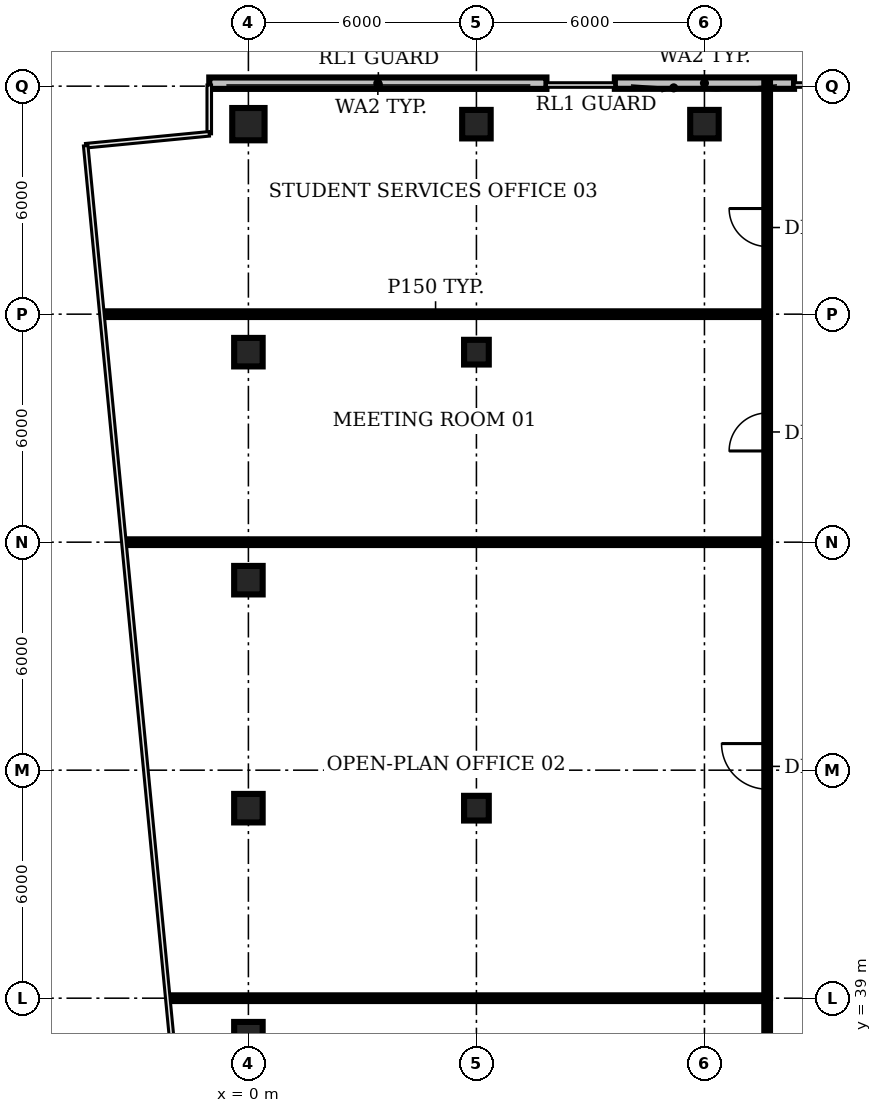
"""IFC4 building model, lengths in metres.
Left out: names, types, materials, properties, quantities, classifications, styles, units other than length and angle.
Written with IfcOpenShell. Run it as: python <this file> out.ifc"""

import sys

from ifc_helpers import new_model, si_unit, direction, frame, frame_2d, origin, origin_2d, place, context, subcontext, project, spatial, rectangle, circle, extrude, element, fill, save


model = new_model("IFC4")
c1 = context("Model", 3, precision=1e-05, world=origin(), true_north=direction((0.0, 1.0)))
c2 = subcontext(c1, "Body", "Model", "MODEL_VIEW")
j1 = project(units=[si_unit("LENGTHUNIT", "METRE"), si_unit("PLANEANGLEUNIT", "RADIAN")], contexts=[c1])
p1 = place(None, origin())
s1 = spatial("IfcSite", under=j1, at=p1, CompositionType="ELEMENT")
p2 = place(p1, origin())
s2 = spatial("IfcBuilding", under=s1, at=p2, CompositionType="ELEMENT")
p3 = place(p2, frame((0.0, 0.0, 310.4)))
s3 = spatial("IfcBuildingStorey", under=s2, at=p3, CompositionType="ELEMENT", Elevation=310.4)
for number, where, z_axis, x_axis in (
    (1, (0.0, 38.0, 0.0), (0.0, 0.0, 1.0), (1.0, 0.0, 0.0)),
    (2, (0.0, 44.0, 0.0), (0.0, 0.0, 1.0), (1.0, 0.0, 0.0)),
    (3, (0.0, 50.0, 0.0), (0.0, 0.0, 1.0), (1.0, 0.0, 0.0)),
    (4, (0.0, 56.0, 0.0), (0.0, 0.0, 1.0), (1.0, 0.0, 0.0)),
):
    element("IfcColumn", number, at=place(p3, frame(where, z_axis=z_axis, x_axis=x_axis)), inside=s3, PredefinedType="COLUMN", context=c2, shape_type="SweptSolid", body=[
        extrude(rectangle(XDim=0.75, YDim=0.75, at=origin_2d()), origin(), (0.0, 0.0, 1.0), 3.9),
    ])
p4 = place(p3, frame((0.0, 62.0, 0.0), z_axis=(0.0, 0.0, 1.0), x_axis=(1.0, 0.0, 0.0)))
e5 = element("IfcColumn", 5, at=p4, inside=s3, PredefinedType="COLUMN", context=c2, shape_type="SweptSolid", body=[
    extrude(circle(Radius=0.425, at=origin_2d()), origin(), (0.0, 0.0, 1.0), 3.9),
])
for number, where, z_axis, x_axis in (
    (6, (6.0, 44.0, 0.0), (0.0, 0.0, 1.0), (1.0, 0.0, 0.0)),
    (7, (6.0, 56.0, 0.0), (0.0, 0.0, 1.0), (1.0, 0.0, 0.0)),
):
    element("IfcColumn", number, at=place(p3, frame(where, z_axis=z_axis, x_axis=x_axis)), inside=s3, PredefinedType="COLUMN", context=c2, shape_type="SweptSolid", body=[
        extrude(rectangle(XDim=0.65, YDim=0.65, at=origin_2d()), origin(), (0.0, 0.0, 1.0), 3.9),
    ])
for number, where, z_axis, x_axis in (
    (8, (6.0, 62.0, 0.0), (0.0, 0.0, 1.0), (1.0, 0.0, 0.0)),
    (9, (12.0, 62.0, 0.0), (0.0, 0.0, 1.0), (1.0, 0.0, 0.0)),
):
    element("IfcColumn", number, at=place(p3, frame(where, z_axis=z_axis, x_axis=x_axis)), inside=s3, PredefinedType="COLUMN", context=c2, shape_type="SweptSolid", body=[
        extrude(rectangle(XDim=0.75, YDim=0.75, at=origin_2d()), origin(), (0.0, 0.0, 1.0), 3.9),
    ])
p5 = place(p3, frame((14.357, 63.08, 0.0), z_axis=(0.0, 0.0, 1.0), x_axis=(-1.0, 0.0, 0.0)))
e10 = element("IfcWall", 10, at=p5, inside=s3, PredefinedType="SOLIDWALL", context=c2, shape_type="SweptSolid", body=[
    extrude(rectangle(XDim=4.715, YDim=0.3, at=frame_2d((2.357, 0.0))), origin(), (0.0, 0.0, 1.0), 3.9),
])
p6 = place(p3, frame((7.843, 63.078, 0.0), z_axis=(0.0, 0.0, 1.0), x_axis=(-1.0, 0.0, 0.0)))
e11 = element("IfcWall", 11, at=p6, inside=s3, PredefinedType="SOLIDWALL", context=c2, shape_type="SweptSolid", body=[
    extrude(rectangle(XDim=8.873, YDim=0.3, at=frame_2d((4.436, 0.0))), origin(), (0.0, 0.0, 1.0), 3.9),
])
p7 = place(p3, frame((-3.8, 57.0, 0.0), z_axis=(0.0, 0.0, 1.0), x_axis=(1.0, 0.0, 0.0)))
e12 = element("IfcWall", 12, at=p7, inside=s3, PredefinedType="PARTITIONING", context=c2, shape_type="SweptSolid", body=[
    extrude(rectangle(XDim=17.45, YDim=0.15, at=frame_2d((8.725, 0.0))), origin(), (0.0, 0.0, 1.0), 2.48),
])
p8 = place(p3, frame((-3.23, 51.0, 0.0), z_axis=(0.0, 0.0, 1.0), x_axis=(1.0, 0.0, 0.0)))
e13 = element("IfcWall", 13, at=p8, inside=s3, PredefinedType="PARTITIONING", context=c2, shape_type="SweptSolid", body=[
    extrude(rectangle(XDim=16.88, YDim=0.15, at=frame_2d((8.44, 0.0))), origin(), (0.0, 0.0, 1.0), 2.48),
])
p9 = place(p3, frame((-2.049, 39.0, 0.0), z_axis=(0.0, 0.0, 1.0), x_axis=(1.0, 0.0, 0.0)))
e14 = element("IfcWall", 14, at=p9, inside=s3, PredefinedType="PARTITIONING", context=c2, shape_type="SweptSolid", body=[
    extrude(rectangle(XDim=15.698, YDim=0.15, at=frame_2d((7.849, 0.0))), origin(), (0.0, 0.0, 1.0), 2.48),
])
p10 = place(p3, frame((13.65, 33.8, 0.0), z_axis=(0.0, 0.0, 1.0), x_axis=(0.0, 1.0, 0.0)))
e15 = element("IfcWall", 15, at=p10, inside=s3, PredefinedType="PARTITIONING", context=c2, shape_type="SweptSolid", body=[
    extrude(rectangle(XDim=5.2, YDim=0.15, at=frame_2d((2.6, 0.0))), origin(), (0.0, 0.0, 1.0), 2.48),
])
p11 = place(p10, frame((2.2, 0.0, 0.0)))
e16 = element("IfcOpeningElement", 16, at=p11, cuts=e15, PredefinedType="OPENING", context=c2, shape_type="SweptSolid", body=[
    extrude(rectangle(XDim=1.0, YDim=2.1, at=frame_2d((0.5, 1.05))), frame((0.0, 0.085, 0.0), z_axis=(0.0, -1.0, 0.0), x_axis=(1.0, 0.0, 0.0)), (0.0, 0.0, 1.0), 0.17),
])
p12 = place(p3, frame((13.65, 39.0, 0.0), z_axis=(0.0, 0.0, 1.0), x_axis=(0.0, 1.0, 0.0)))
e17 = element("IfcWall", 17, at=p12, inside=s3, PredefinedType="PARTITIONING", context=c2, shape_type="SweptSolid", body=[
    extrude(rectangle(XDim=12.0, YDim=0.15, at=frame_2d((6.0, 0.0))), origin(), (0.0, 0.0, 1.0), 2.48),
])
p13 = place(p12, frame((5.5, 0.0, 0.0)))
e18 = element("IfcOpeningElement", 18, at=p13, cuts=e17, PredefinedType="OPENING", context=c2, shape_type="SweptSolid", body=[
    extrude(rectangle(XDim=1.2, YDim=2.1, at=frame_2d((0.6, 1.05))), frame((0.0, 0.085, 0.0), z_axis=(0.0, -1.0, 0.0), x_axis=(1.0, 0.0, 0.0)), (0.0, 0.0, 1.0), 0.17),
])
p14 = place(p3, frame((13.65, 51.0, 0.0), z_axis=(0.0, 0.0, 1.0), x_axis=(0.0, 1.0, 0.0)))
e19 = element("IfcWall", 19, at=p14, inside=s3, PredefinedType="PARTITIONING", context=c2, shape_type="SweptSolid", body=[
    extrude(rectangle(XDim=6.0, YDim=0.15, at=frame_2d((3.0, 0.0))), origin(), (0.0, 0.0, 1.0), 2.48),
])
p15 = place(p14, frame((2.4, 0.0, 0.0)))
e20 = element("IfcOpeningElement", 20, at=p15, cuts=e19, PredefinedType="OPENING", context=c2, shape_type="SweptSolid", body=[
    extrude(rectangle(XDim=1.0, YDim=2.1, at=frame_2d((0.5, 1.05))), frame((0.0, 0.085, 0.0), z_axis=(0.0, -1.0, 0.0), x_axis=(1.0, 0.0, 0.0)), (0.0, 0.0, 1.0), 0.17),
])
p16 = place(p3, frame((13.65, 57.0, 0.0), z_axis=(0.0, 0.0, 1.0), x_axis=(0.0, 1.0, 0.0)))
e21 = element("IfcWall", 21, at=p16, inside=s3, PredefinedType="PARTITIONING", context=c2, shape_type="SweptSolid", body=[
    extrude(rectangle(XDim=6.09, YDim=0.15, at=frame_2d((3.045, 0.0))), origin(), (0.0, 0.0, 1.0), 2.48),
])
p17 = place(p16, frame((1.78, 0.0, 0.0)))
e22 = element("IfcOpeningElement", 22, at=p17, cuts=e21, PredefinedType="OPENING", context=c2, shape_type="SweptSolid", body=[
    extrude(rectangle(XDim=1.0, YDim=2.1, at=frame_2d((0.5, 1.05))), frame((0.0, 0.085, 0.0), z_axis=(0.0, -1.0, 0.0), x_axis=(1.0, 0.0, 0.0)), (0.0, 0.0, 1.0), 0.17),
])
p18 = place(p13, origin())
e23 = element("IfcDoor", 23, at=p18, inside=s3, OperationType="SINGLE_SWING_RIGHT", PredefinedType="DOOR", context=c2, shape_type="SweptSolid", body=[
    extrude(rectangle(XDim=1.2, YDim=2.1, at=frame_2d((0.6, 1.05))), frame((0.0, 0.025, 0.0), z_axis=(0.0, -1.0, 0.0), x_axis=(1.0, 0.0, 0.0)), (0.0, 0.0, 1.0), 0.05),
])
fill(e18, e23)
p19 = place(p15, origin())
e24 = element("IfcDoor", 24, at=p19, inside=s3, OperationType="SINGLE_SWING_LEFT", PredefinedType="DOOR", context=c2, shape_type="SweptSolid", body=[
    extrude(rectangle(XDim=1.0, YDim=2.1, at=frame_2d((0.5, 1.05))), frame((0.0, 0.025, 0.0), z_axis=(0.0, -1.0, 0.0), x_axis=(1.0, 0.0, 0.0)), (0.0, 0.0, 1.0), 0.05),
])
fill(e20, e24)
p20 = place(p17, origin())
e25 = element("IfcDoor", 25, at=p20, inside=s3, OperationType="SINGLE_SWING_RIGHT", PredefinedType="DOOR", context=c2, shape_type="SweptSolid", body=[
    extrude(rectangle(XDim=1.0, YDim=2.1, at=frame_2d((0.5, 1.05))), frame((0.0, 0.025, 0.0), z_axis=(0.0, -1.0, 0.0), x_axis=(1.0, 0.0, 0.0)), (0.0, 0.0, 1.0), 0.05),
])
fill(e22, e25)
save(model, sys.argv[1])
